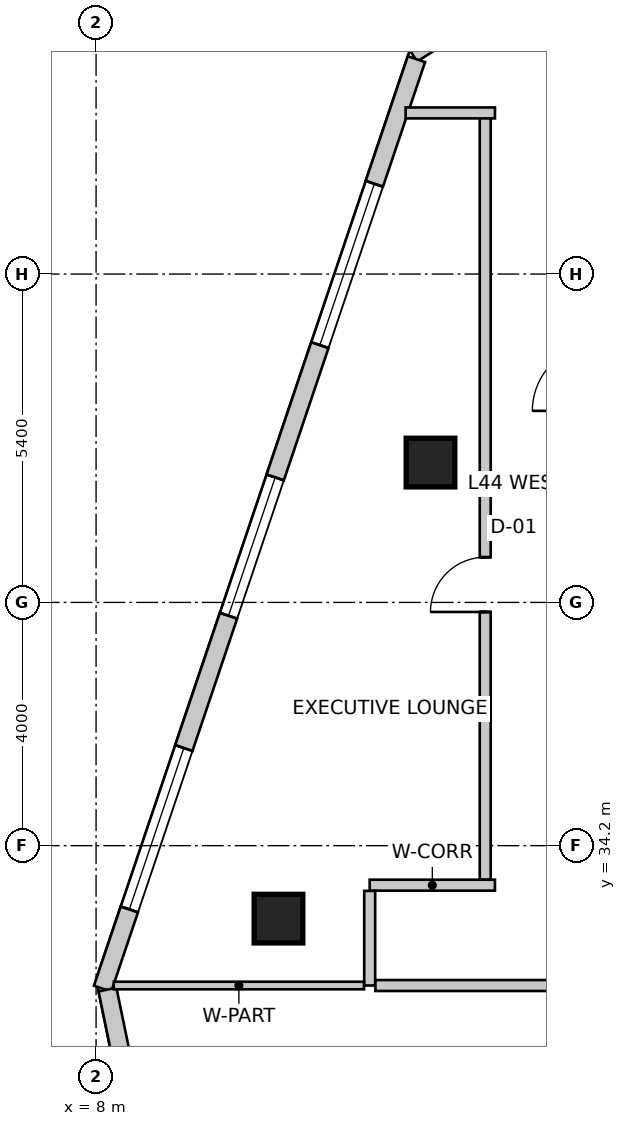
"""IFC4 building model, lengths in metres.
Left out: names, types, materials, properties, quantities, classifications, styles, units other than length and angle.
Written with IfcOpenShell. Run it as: python <this file> out.ifc"""

import sys

from ifc_helpers import new_model, si_unit, direction, frame, frame_2d, origin, origin_2d, place, context, subcontext, project, spatial, rectangle, extrude, source, transform, mapped, element, fill, save


model = new_model("IFC4")
c1 = context("Model", 3, precision=1e-05, world=origin(), true_north=direction((0.0, 1.0)))
c2 = subcontext(c1, "Body", "Model", "MODEL_VIEW")
j1 = project(units=[si_unit("LENGTHUNIT", "METRE"), si_unit("PLANEANGLEUNIT", "RADIAN")], contexts=[c1])
p1 = place(None, origin())
s1 = spatial("IfcSite", under=j1, at=p1, CompositionType="ELEMENT")
p2 = place(p1, origin())
s2 = spatial("IfcBuilding", under=s1, at=p2, CompositionType="ELEMENT")
p3 = place(p2, frame((0.0, 0.0, 178.2)))
s3 = spatial("IfcBuildingStorey", under=s2, at=p3, CompositionType="ELEMENT", Elevation=178.2)
m1 = source(origin(), c2, "Body", "SweptSolid", [
    extrude(rectangle(XDim=0.8, YDim=0.8, at=origin_2d()), origin(), (0.0, 0.0, 1.0), 5.2),
])
for number, where, z_axis, x_axis in (
    (1, (11.0, 33.0, 0.0), (0.0, 0.0, 1.0), (1.0, 0.0, 0.0)),
    (2, (13.5, 40.5, 0.0), (0.0, 0.0, 1.0), (1.0, 0.0, 0.0)),
):
    element("IfcColumn", number, at=place(p3, frame(where, z_axis=z_axis, x_axis=x_axis)), inside=s3, PredefinedType="COLUMN", context=c2, shape_type="MappedRepresentation", body=[
        mapped(m1, transform((0.0, 0.0, 0.0), scale=1.0)),
    ])
p4 = place(p3, frame((21.875, 52.742, 0.0), z_axis=(0.0, 0.0, 1.0), x_axis=(-0.843666375448, -0.536867811419, 0.0)))
e3 = element("IfcWall", 3, at=p4, inside=s3, PredefinedType="SOLIDWALL", context=c2, shape_type="SweptSolid", body=[
    extrude(rectangle(XDim=10.284, YDim=0.3, at=frame_2d((5.142, 0.0))), origin(), (0.0, 0.0, 1.0), 4.95),
])
m2 = source(origin(), c2, "Body", "SweptSolid", [
    extrude(rectangle(XDim=2.4, YDim=2.2, at=frame_2d((1.2, 1.1))), frame((0.0, 0.16, 0.0), z_axis=(0.0, -1.0, 0.0), x_axis=(1.0, 0.0, 0.0)), (0.0, 0.0, 1.0), 0.32),
])
p5 = place(p4, frame((3.307, 0.0, 0.85)))
e4 = element("IfcOpeningElement", 4, at=p5, cuts=e3, PredefinedType="OPENING", context=c2, shape_type="MappedRepresentation", body=[
    mapped(m2, transform((0.0, 0.0, 0.0), scale=1.0)),
])
p6 = place(p3, frame((13.269, 47.134, 0.0), z_axis=(0.0, 0.0, 1.0), x_axis=(-0.319920776449, -0.947444297464, 0.0)))
e5 = element("IfcWall", 5, at=p6, inside=s3, PredefinedType="SOLIDWALL", context=c2, shape_type="SweptSolid", body=[
    extrude(rectangle(XDim=16.133, YDim=0.3, at=frame_2d((8.067, 0.0))), origin(), (0.0, 0.0, 1.0), 4.95),
])
m3 = source(origin(), c2, "Body", "SweptSolid", [
    extrude(rectangle(XDim=2.8, YDim=2.4, at=frame_2d((1.4, 1.2))), frame((0.0, 0.16, 0.0), z_axis=(0.0, -1.0, 0.0), x_axis=(1.0, 0.0, 0.0)), (0.0, 0.0, 1.0), 0.32),
])
p7 = place(p6, frame((2.163, 0.0, 0.85)))
e6 = element("IfcOpeningElement", 6, at=p7, cuts=e5, PredefinedType="OPENING", context=c2, shape_type="MappedRepresentation", body=[
    mapped(m3, transform((0.0, 0.0, 0.0), scale=1.0)),
])
p8 = place(p6, frame((7.26, 0.0, 0.85)))
e7 = element("IfcOpeningElement", 7, at=p8, cuts=e5, PredefinedType="OPENING", context=c2, shape_type="MappedRepresentation", body=[
    mapped(m2, transform((0.0, 0.0, 0.0), scale=1.0)),
])
p9 = place(p6, frame((11.957, 0.0, 0.85)))
e8 = element("IfcOpeningElement", 8, at=p9, cuts=e5, PredefinedType="OPENING", context=c2, shape_type="MappedRepresentation", body=[
    mapped(m3, transform((0.0, 0.0, 0.0), scale=1.0)),
])
p10 = place(p3, frame((8.188, 31.834, 0.0), z_axis=(0.0, 0.0, 1.0), x_axis=(0.202303475707, -0.979322880217, 0.0)))
e9 = element("IfcWall", 9, at=p10, inside=s3, PredefinedType="SOLIDWALL", context=c2, shape_type="SweptSolid", body=[
    extrude(rectangle(XDim=15.766, YDim=0.3, at=frame_2d((7.883, 0.0))), origin(), (0.0, 0.0, 1.0), 4.95),
])
p11 = place(p10, frame((1.995, 0.0, 0.85)))
e10 = element("IfcOpeningElement", 10, at=p11, cuts=e9, PredefinedType="OPENING", context=c2, shape_type="MappedRepresentation", body=[
    mapped(m2, transform((0.0, 0.0, 0.0), scale=1.0)),
])
p12 = place(p10, frame((7.546, 0.0, 0.85)))
e11 = element("IfcOpeningElement", 11, at=p12, cuts=e9, PredefinedType="OPENING", context=c2, shape_type="MappedRepresentation", body=[
    mapped(m3, transform((0.0, 0.0, 0.0), scale=1.0)),
])
p13 = place(p10, frame((12.653, 0.0, 0.85)))
e12 = element("IfcOpeningElement", 12, at=p13, cuts=e9, PredefinedType="OPENING", context=c2, shape_type="MappedRepresentation", body=[
    mapped(m2, transform((0.0, 0.0, 0.0), scale=1.0)),
])
p14 = place(p3, frame((12.5, 33.55, 0.0), z_axis=(0.0, 0.0, 1.0), x_axis=(1.0, 0.0, 0.0)))
e13 = element("IfcWall", 13, at=p14, inside=s3, PredefinedType="PARTITIONING", context=c2, shape_type="SweptSolid", body=[
    extrude(rectangle(XDim=2.06, YDim=0.18, at=frame_2d((1.03, 0.0))), origin(), (0.0, 0.0, 1.0), 4.95),
])
p15 = place(p3, frame((12.5, 31.9, 0.0), z_axis=(0.0, 0.0, 1.0), x_axis=(0.0, 1.0, 0.0)))
e14 = element("IfcWall", 14, at=p15, inside=s3, PredefinedType="PARTITIONING", context=c2, shape_type="SweptSolid", body=[
    extrude(rectangle(XDim=1.556, YDim=0.18, at=frame_2d((0.778, 0.0))), origin(), (0.0, 0.0, 1.0), 4.634),
])
p16 = place(p3, frame((26.76, 31.9, 0.0), z_axis=(0.0, 0.0, 1.0), x_axis=(-1.0, 0.0, 0.0)))
e15 = element("IfcWall", 15, at=p16, inside=s3, PredefinedType="PARTITIONING", context=c2, shape_type="SweptSolid", body=[
    extrude(rectangle(XDim=14.166, YDim=0.18, at=frame_2d((7.083, 0.0))), origin(), (0.0, 0.0, 1.0), 4.634),
])
m4 = source(origin(), c2, "Body", "SweptSolid", [
    extrude(rectangle(XDim=1.6, YDim=2.15, at=frame_2d((0.8, 1.075))), frame((0.0, 0.1, 0.0), z_axis=(0.0, -1.0, 0.0), x_axis=(1.0, 0.0, 0.0)), (0.0, 0.0, 1.0), 0.2),
])
p17 = place(p16, frame((6.283, 0.0, 0.0)))
e16 = element("IfcOpeningElement", 16, at=p17, cuts=e15, PredefinedType="OPENING", context=c2, shape_type="MappedRepresentation", body=[
    mapped(m4, transform((0.0, 0.0, 0.0), scale=1.0)),
])
p18 = place(p3, frame((14.4, 33.644, 0.0), z_axis=(0.0, 0.0, 1.0), x_axis=(0.0, 1.0, 0.0)))
e17 = element("IfcWall", 17, at=p18, inside=s3, PredefinedType="PARTITIONING", context=c2, shape_type="SweptSolid", body=[
    extrude(rectangle(XDim=12.606, YDim=0.18, at=frame_2d((6.303, 0.0))), origin(), (0.0, 0.0, 1.0), 4.95),
])
m5 = source(origin(), c2, "Body", "SweptSolid", [
    extrude(rectangle(XDim=0.9, YDim=2.15, at=frame_2d((0.45, 1.075))), frame((0.0, 0.1, 0.0), z_axis=(0.0, -1.0, 0.0), x_axis=(1.0, 0.0, 0.0)), (0.0, 0.0, 1.0), 0.2),
])
p19 = place(p18, frame((4.399, 0.0, 0.0)))
e18 = element("IfcOpeningElement", 18, at=p19, cuts=e17, PredefinedType="OPENING", context=c2, shape_type="MappedRepresentation", body=[
    mapped(m5, transform((0.0, 0.0, 0.0), scale=1.0)),
])
p20 = place(p3, frame((14.56, 46.25, 0.0), z_axis=(0.0, 0.0, 1.0), x_axis=(-1.0, 0.0, 0.0)))
e19 = element("IfcWall", 19, at=p20, inside=s3, PredefinedType="PARTITIONING", context=c2, shape_type="SweptSolid", body=[
    extrude(rectangle(XDim=1.469, YDim=0.18, at=frame_2d((0.734, 0.0))), origin(), (0.0, 0.0, 1.0), 4.95),
])
p21 = place(p3, frame((12.406, 31.9, 0.0), z_axis=(0.0, 0.0, 1.0), x_axis=(-1.0, 0.0, 0.0)))
e20 = element("IfcWall", 20, at=p21, inside=s3, PredefinedType="PARTITIONING", context=c2, shape_type="SweptSolid", body=[
    extrude(rectangle(XDim=4.115, YDim=0.125, at=frame_2d((2.057, 0.0))), origin(), (0.0, 0.0, 1.0), 4.242),
])
m6 = source(origin(), c2, "Body", "SweptSolid", [
    extrude(rectangle(XDim=2.8, YDim=2.4, at=frame_2d((1.4, 1.2))), frame((0.0, -0.015, 0.0), z_axis=(0.0, -1.0, 0.0), x_axis=(1.0, 0.0, 0.0)), (0.0, 0.0, 1.0), 0.06),
])
p22 = place(p7, origin())
e21 = element("IfcWindow", 21, at=p22, inside=s3, PartitioningType="SINGLE_PANEL", PredefinedType="WINDOW", context=c2, shape_type="MappedRepresentation", body=[
    mapped(m6, transform((0.0, 0.0, 0.0), scale=1.0)),
])
fill(e6, e21)
m7 = source(origin(), c2, "Body", "SweptSolid", [
    extrude(rectangle(XDim=2.4, YDim=2.2, at=frame_2d((1.2, 1.1))), frame((0.0, -0.015, 0.0), z_axis=(0.0, -1.0, 0.0), x_axis=(1.0, 0.0, 0.0)), (0.0, 0.0, 1.0), 0.06),
])
p23 = place(p8, origin())
e22 = element("IfcWindow", 22, at=p23, inside=s3, PartitioningType="SINGLE_PANEL", PredefinedType="WINDOW", context=c2, shape_type="MappedRepresentation", body=[
    mapped(m7, transform((0.0, 0.0, 0.0), scale=1.0)),
])
fill(e7, e22)
p24 = place(p9, origin())
e23 = element("IfcWindow", 23, at=p24, inside=s3, PartitioningType="SINGLE_PANEL", PredefinedType="WINDOW", context=c2, shape_type="MappedRepresentation", body=[
    mapped(m6, transform((0.0, 0.0, 0.0), scale=1.0)),
])
fill(e8, e23)
m8 = source(origin(), c2, "Body", "SweptSolid", [
    extrude(rectangle(XDim=0.9, YDim=2.15, at=frame_2d((0.45, 1.075))), frame((0.0, 0.025, 0.0), z_axis=(0.0, -1.0, 0.0), x_axis=(1.0, 0.0, 0.0)), (0.0, 0.0, 1.0), 0.05),
])
p25 = place(p19, origin())
e24 = element("IfcDoor", 24, at=p25, inside=s3, OperationType="SINGLE_SWING_LEFT", PredefinedType="DOOR", context=c2, shape_type="MappedRepresentation", body=[
    mapped(m8, transform((0.0, 0.0, 0.0), scale=1.0)),
])
fill(e18, e24)
save(model, sys.argv[1])
